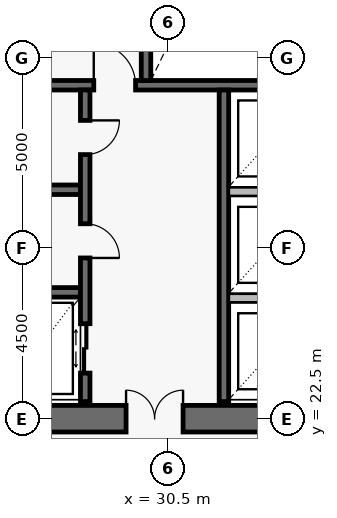
"""IFC4 building model, lengths in metres.
Left out: names, types, materials, properties, quantities, classifications, styles, units other than length and angle.
Written with IfcOpenShell. Run it as: python <this file> out.ifc"""

import sys

from ifc_helpers import new_model, si_unit, direction, frame, frame_2d, origin, place, context, subcontext, project, spatial, rectangle, extrude, element, fill, save


model = new_model("IFC4")
c1 = context("Model", 3, precision=1e-05, world=origin(), true_north=direction((0.0, 1.0)))
c2 = subcontext(c1, "Body", "Model", "MODEL_VIEW")
j1 = project(units=[si_unit("LENGTHUNIT", "METRE"), si_unit("PLANEANGLEUNIT", "RADIAN")], contexts=[c1])
p1 = place(None, origin())
s1 = spatial("IfcSite", under=j1, at=p1, CompositionType="ELEMENT")
p2 = place(p1, origin())
s2 = spatial("IfcBuilding", under=s1, at=p2, CompositionType="ELEMENT")
p3 = place(p2, frame((0.0, 0.0, 103.8)))
s3 = spatial("IfcBuildingStorey", under=s2, at=p3, CompositionType="ELEMENT", Elevation=103.8)
p4 = place(p3, frame((25.15, 22.5, 0.0), z_axis=(0.0, 0.0, 1.0), x_axis=(1.0, 0.0, 0.0)))
e1 = element("IfcWall", 1, at=p4, inside=s3, PredefinedType="SHEAR", context=c2, shape_type="SweptSolid", body=[
    extrude(rectangle(XDim=9.9, YDim=0.7, at=frame_2d((4.95, 0.0))), origin(), (0.0, 0.0, 1.0), 3.8),
])
p5 = place(p4, frame((4.25, 0.0, 0.0)))
e2 = element("IfcOpeningElement", 2, at=p5, cuts=e1, PredefinedType="OPENING", context=c2, shape_type="SweptSolid", body=[
    extrude(rectangle(XDim=1.5, YDim=2.15, at=frame_2d((0.75, 1.075))), frame((0.0, 0.362, 0.0), z_axis=(0.0, -1.0, 0.0), x_axis=(1.0, 0.0, 0.0)), (0.0, 0.0, 1.0), 0.724),
])
p6 = place(p3, frame((25.95, 31.275, 0.0), z_axis=(0.0, 0.0, 1.0), x_axis=(1.0, 0.0, 0.0)))
e3 = element("IfcWall", 3, at=p6, inside=s3, PredefinedType="SOLIDWALL", context=c2, shape_type="SweptSolid", body=[
    extrude(rectangle(XDim=20.1, YDim=0.25, at=frame_2d((10.05, 0.0))), origin(), (0.0, 0.0, 1.0), 3.8),
])
p7 = place(p6, frame((2.6, 0.0, 0.0)))
e4 = element("IfcOpeningElement", 4, at=p7, cuts=e3, PredefinedType="OPENING", context=c2, shape_type="SweptSolid", body=[
    extrude(rectangle(XDim=1.1, YDim=2.15, at=frame_2d((0.55, 1.075))), frame((0.0, 0.137, 0.0), z_axis=(0.0, -1.0, 0.0), x_axis=(1.0, 0.0, 0.0)), (0.0, 0.0, 1.0), 0.274),
])
p8 = place(p6, frame((10.6, 0.0, 0.0)))
e5 = element("IfcOpeningElement", 5, at=p8, cuts=e3, PredefinedType="OPENING", context=c2, shape_type="SweptSolid", body=[
    extrude(rectangle(XDim=1.1, YDim=2.15, at=frame_2d((0.55, 1.075))), frame((0.0, 0.137, 0.0), z_axis=(0.0, -1.0, 0.0), x_axis=(1.0, 0.0, 0.0)), (0.0, 0.0, 1.0), 0.274),
])
p9 = place(p6, frame((16.35, 0.0, 0.0)))
e6 = element("IfcOpeningElement", 6, at=p9, cuts=e3, PredefinedType="OPENING", context=c2, shape_type="SweptSolid", body=[
    extrude(rectangle(XDim=1.1, YDim=2.15, at=frame_2d((0.55, 1.075))), frame((0.0, 0.137, 0.0), z_axis=(0.0, -1.0, 0.0), x_axis=(1.0, 0.0, 0.0)), (0.0, 0.0, 1.0), 0.274),
])
p10 = place(p3, frame((29.925, 31.4, 0.0), z_axis=(0.0, 0.0, 1.0), x_axis=(0.0, 1.0, 0.0)))
e7 = element("IfcWall", 7, at=p10, inside=s3, PredefinedType="SOLIDWALL", context=c2, shape_type="SweptSolid", body=[
    extrude(rectangle(XDim=9.7, YDim=0.25, at=frame_2d((4.85, 0.0))), origin(), (0.0, 0.0, 1.0), 3.8),
])
for number, where, z_axis, x_axis in (
    (8, (25.95, 25.825, 0.0), (0.0, 0.0, 1.0), (1.0, 0.0, 0.0)),
    (9, (25.95, 28.525, 0.0), (0.0, 0.0, 1.0), (1.0, 0.0, 0.0)),
):
    element("IfcWall", number, at=place(p3, frame(where, z_axis=z_axis, x_axis=x_axis)), inside=s3, PredefinedType="SOLIDWALL", context=c2, shape_type="SweptSolid", body=[
        extrude(rectangle(XDim=2.25, YDim=0.25, at=frame_2d((1.125, 0.0))), origin(), (0.0, 0.0, 1.0), 3.8),
    ])
p11 = place(p3, frame((28.325, 22.95, 0.0), z_axis=(0.0, 0.0, 1.0), x_axis=(0.0, 1.0, 0.0)))
e10 = element("IfcWall", 10, at=p11, inside=s3, PredefinedType="SOLIDWALL", context=c2, shape_type="SweptSolid", body=[
    extrude(rectangle(XDim=8.2, YDim=0.25, at=frame_2d((4.1, 0.0))), origin(), (0.0, 0.0, 1.0), 3.8),
])
p12 = place(p11, frame((0.75, 0.0, 0.0)))
e11 = element("IfcOpeningElement", 11, at=p12, cuts=e10, PredefinedType="OPENING", context=c2, shape_type="SweptSolid", body=[
    extrude(rectangle(XDim=1.3, YDim=2.3, at=frame_2d((0.65, 1.15))), frame((0.0, 0.137, 0.0), z_axis=(0.0, -1.0, 0.0), x_axis=(1.0, 0.0, 0.0)), (0.0, 0.0, 1.0), 0.274),
])
p13 = place(p11, frame((3.78, 0.0, 0.0)))
e12 = element("IfcOpeningElement", 12, at=p13, cuts=e10, PredefinedType="OPENING", context=c2, shape_type="SweptSolid", body=[
    extrude(rectangle(XDim=0.9, YDim=2.1, at=frame_2d((0.45, 1.05))), frame((0.0, 0.137, 0.0), z_axis=(0.0, -1.0, 0.0), x_axis=(1.0, 0.0, 0.0)), (0.0, 0.0, 1.0), 0.274),
])
p14 = place(p11, frame((6.5, 0.0, 0.0)))
e13 = element("IfcOpeningElement", 13, at=p14, cuts=e10, PredefinedType="OPENING", context=c2, shape_type="SweptSolid", body=[
    extrude(rectangle(XDim=0.9, YDim=2.1, at=frame_2d((0.45, 1.05))), frame((0.0, 0.137, 0.0), z_axis=(0.0, -1.0, 0.0), x_axis=(1.0, 0.0, 0.0)), (0.0, 0.0, 1.0), 0.274),
])
p15 = place(p3, frame((31.975, 22.95, 0.0), z_axis=(0.0, 0.0, 1.0), x_axis=(0.0, 1.0, 0.0)))
e14 = element("IfcWall", 14, at=p15, inside=s3, PredefinedType="SOLIDWALL", context=c2, shape_type="SweptSolid", body=[
    extrude(rectangle(XDim=8.2, YDim=0.25, at=frame_2d((4.1, 0.0))), origin(), (0.0, 0.0, 1.0), 3.8),
])
for number, where, z_axis, x_axis in (
    (15, (32.108, 25.675, 0.0), (0.0, 0.0, 1.0), (1.0, 0.0, 0.0)),
    (16, (32.108, 28.475, 0.0), (0.0, 0.0, 1.0), (1.0, 0.0, 0.0)),
):
    element("IfcWall", number, at=place(p3, frame(where, z_axis=z_axis, x_axis=x_axis)), inside=s3, PredefinedType="PARTITIONING", context=c2, shape_type="SweptSolid", body=[
        extrude(rectangle(XDim=2.284, YDim=0.22, at=frame_2d((1.142, 0.0))), origin(), (0.0, 0.0, 1.0), 3.55),
    ])
p16 = place(p5, origin())
e17 = element("IfcDoor", 17, at=p16, inside=s3, OperationType="DOUBLE_DOOR_SINGLE_SWING", PredefinedType="DOOR", context=c2, shape_type="SweptSolid", body=[
    extrude(rectangle(XDim=1.5, YDim=2.15, at=frame_2d((0.75, 1.075))), frame((0.0, 0.025, 0.0), z_axis=(0.0, -1.0, 0.0), x_axis=(1.0, 0.0, 0.0)), (0.0, 0.0, 1.0), 0.05),
])
fill(e2, e17)
p17 = place(p7, origin())
e18 = element("IfcDoor", 18, at=p17, inside=s3, OperationType="SINGLE_SWING_LEFT", PredefinedType="USERDEFINED", context=c2, shape_type="SweptSolid", body=[
    extrude(rectangle(XDim=1.1, YDim=2.15, at=frame_2d((0.55, 1.075))), frame((0.0, 0.025, 0.0), z_axis=(0.0, -1.0, 0.0), x_axis=(1.0, 0.0, 0.0)), (0.0, 0.0, 1.0), 0.05),
])
fill(e4, e18)
p18 = place(p12, frame((1.3, 0.0, 0.0), z_axis=(0.0, 0.0, 1.0), x_axis=(-1.0, 0.0, 0.0)))
e19 = element("IfcDoor", 19, at=p18, inside=s3, OperationType="DOUBLE_DOOR_SLIDING", PredefinedType="DOOR", context=c2, shape_type="SweptSolid", body=[
    extrude(rectangle(XDim=1.3, YDim=2.3, at=frame_2d((0.65, 1.15))), frame((0.0, 0.025, 0.0), z_axis=(0.0, -1.0, 0.0), x_axis=(1.0, 0.0, 0.0)), (0.0, 0.0, 1.0), 0.05),
])
fill(e11, e19)
p19 = place(p13, frame((0.9, 0.0, 0.0), z_axis=(0.0, 0.0, 1.0), x_axis=(-1.0, 0.0, 0.0)))
e20 = element("IfcDoor", 20, at=p19, inside=s3, OperationType="SINGLE_SWING_RIGHT", PredefinedType="DOOR", context=c2, shape_type="SweptSolid", body=[
    extrude(rectangle(XDim=0.9, YDim=2.1, at=frame_2d((0.45, 1.05))), frame((0.0, 0.025, 0.0), z_axis=(0.0, -1.0, 0.0), x_axis=(1.0, 0.0, 0.0)), (0.0, 0.0, 1.0), 0.05),
])
fill(e12, e20)
p20 = place(p14, frame((0.9, 0.0, 0.0), z_axis=(0.0, 0.0, 1.0), x_axis=(-1.0, 0.0, 0.0)))
e21 = element("IfcDoor", 21, at=p20, inside=s3, OperationType="SINGLE_SWING_LEFT", PredefinedType="DOOR", context=c2, shape_type="SweptSolid", body=[
    extrude(rectangle(XDim=0.9, YDim=2.1, at=frame_2d((0.45, 1.05))), frame((0.0, 0.025, 0.0), z_axis=(0.0, -1.0, 0.0), x_axis=(1.0, 0.0, 0.0)), (0.0, 0.0, 1.0), 0.05),
])
fill(e13, e21)
save(model, sys.argv[1])
